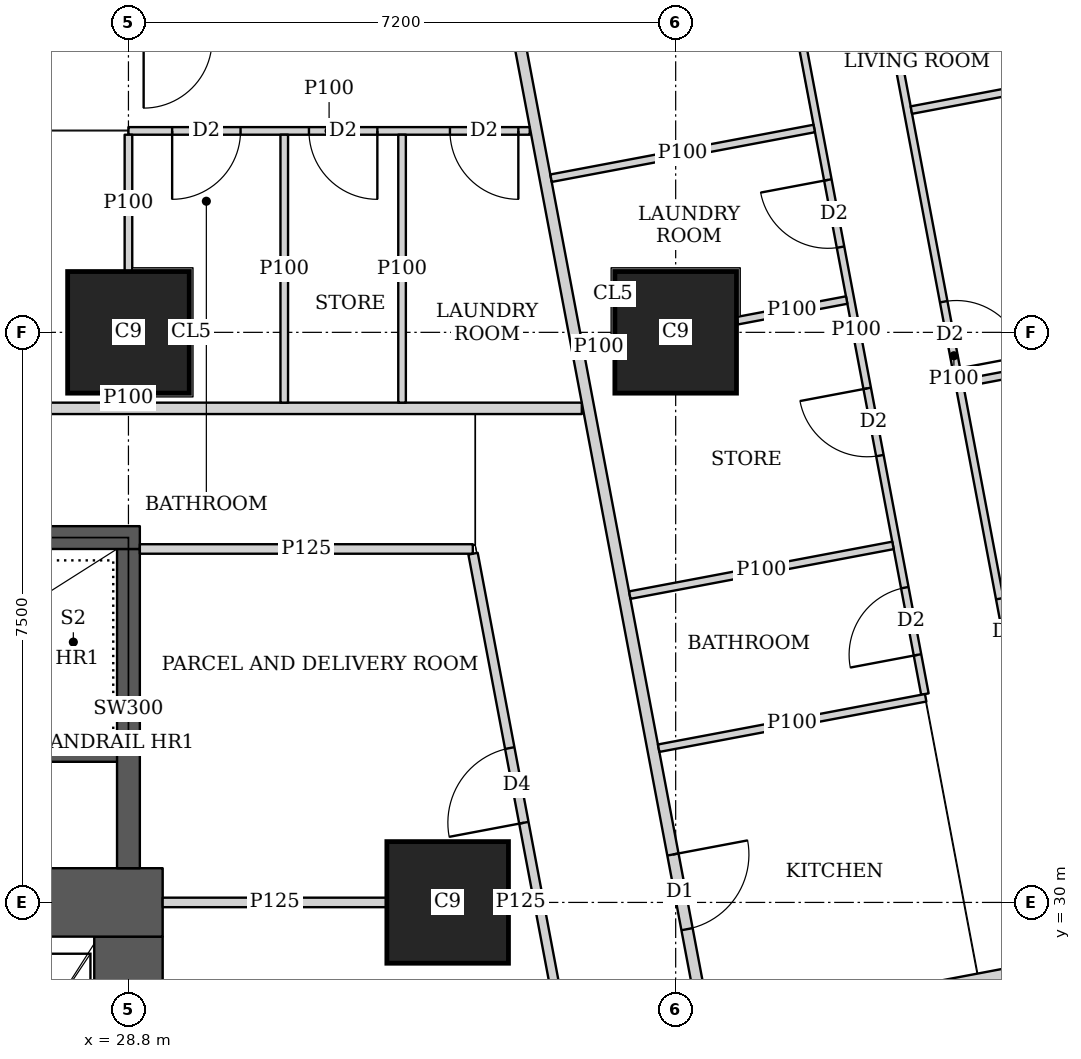
"""IFC4 building model, lengths in metres.
Left out: names, types, materials, properties, quantities, classifications, styles, units other than length and angle.
Written with IfcOpenShell. Run it as: python <this file> out.ifc"""

import sys

from ifc_helpers import new_model, si_unit, direction, frame, frame_2d, origin, origin_2d, place, context, subcontext, project, spatial, rectangle, extrude, element, fill, save


model = new_model("IFC4")
c1 = context("Model", 3, precision=1e-05, world=origin(), true_north=direction((0.0, 1.0)))
c2 = subcontext(c1, "Body", "Model", "MODEL_VIEW")
j1 = project(units=[si_unit("LENGTHUNIT", "METRE"), si_unit("PLANEANGLEUNIT", "RADIAN")], contexts=[c1])
p1 = place(None, origin())
s1 = spatial("IfcSite", under=j1, at=p1, CompositionType="ELEMENT")
p2 = place(p1, origin())
s2 = spatial("IfcBuilding", under=s1, at=p2, CompositionType="ELEMENT")
p3 = place(p2, frame((0.0, 0.0, 89.15)))
s3 = spatial("IfcBuildingStorey", under=s2, at=p3, CompositionType="ELEMENT", Elevation=89.15)
for number, where, z_axis, x_axis in (
    (1, (33.0, 30.0, 0.0), (0.0, 0.0, 1.0), (1.0, 0.0, 0.0)),
    (2, (28.8, 37.5, 0.0), (0.0, 0.0, 1.0), (1.0, 0.0, 0.0)),
    (3, (36.0, 37.5, 0.0), (0.0, 0.0, 1.0), (1.0, 0.0, 0.0)),
):
    element("IfcColumn", number, at=place(p3, frame(where, z_axis=z_axis, x_axis=x_axis)), inside=s3, PredefinedType="COLUMN", context=c2, shape_type="SweptSolid", body=[
        extrude(rectangle(XDim=1.6, YDim=1.6, at=origin_2d()), origin(), (0.0, 0.0, 1.0), 3.75),
    ])
p4 = place(p3, frame((13.95, 30.0, 0.0), z_axis=(0.0, 0.0, 1.0), x_axis=(1.0, 0.0, 0.0)))
e4 = element("IfcWall", 4, at=p4, inside=s3, PredefinedType="SHEAR", context=c2, shape_type="SweptSolid", body=[
    extrude(rectangle(XDim=15.3, YDim=0.9, at=frame_2d((7.65, 0.0))), origin(), (0.0, 0.0, 1.0), 3.75),
])
p5 = place(p4, frame((4.45, 0.0, 0.0)))
e5 = element("IfcOpeningElement", 5, at=p5, cuts=e4, PredefinedType="OPENING", context=c2, shape_type="SweptSolid", body=[
    extrude(rectangle(XDim=1.8, YDim=2.1, at=frame_2d((0.9, 1.05))), frame((0.0, 0.46, 0.0), z_axis=(0.0, -1.0, 0.0), x_axis=(1.0, 0.0, 0.0)), (0.0, 0.0, 1.0), 0.92),
])
p6 = place(p4, frame((10.7, 0.0, 0.0)))
e6 = element("IfcOpeningElement", 6, at=p6, cuts=e4, PredefinedType="OPENING", context=c2, shape_type="SweptSolid", body=[
    extrude(rectangle(XDim=1.1, YDim=2.1, at=frame_2d((0.55, 1.05))), frame((0.0, 0.46, 0.0), z_axis=(0.0, -1.0, 0.0), x_axis=(1.0, 0.0, 0.0)), (0.0, 0.0, 1.0), 0.92),
])
p7 = place(p3, frame((28.8, 15.45, 0.0), z_axis=(0.0, 0.0, 1.0), x_axis=(0.0, 1.0, 0.0)))
e7 = element("IfcWall", 7, at=p7, inside=s3, PredefinedType="SHEAR", context=c2, shape_type="SweptSolid", body=[
    extrude(rectangle(XDim=14.1, YDim=0.9, at=frame_2d((7.05, 0.0))), origin(), (0.0, 0.0, 1.0), 3.75),
])
p8 = place(p3, frame((21.45, 34.8, 0.0), z_axis=(0.0, 0.0, 1.0), x_axis=(1.0, 0.0, 0.0)))
e8 = element("IfcWall", 8, at=p8, inside=s3, PredefinedType="SHEAR", context=c2, shape_type="SweptSolid", body=[
    extrude(rectangle(XDim=7.5, YDim=0.3, at=frame_2d((3.75, 0.0))), origin(), (0.0, 0.0, 1.0), 3.75),
])
p9 = place(p8, frame((0.5, 0.0, 0.0)))
e9 = element("IfcOpeningElement", 9, at=p9, cuts=e8, PredefinedType="OPENING", context=c2, shape_type="SweptSolid", body=[
    extrude(rectangle(XDim=1.1, YDim=2.1, at=frame_2d((0.55, 1.05))), frame((0.0, 0.16, 0.0), z_axis=(0.0, -1.0, 0.0), x_axis=(1.0, 0.0, 0.0)), (0.0, 0.0, 1.0), 0.32),
])
p10 = place(p3, frame((28.8, 30.45, 0.0), z_axis=(0.0, 0.0, 1.0), x_axis=(0.0, 1.0, 0.0)))
e10 = element("IfcWall", 10, at=p10, inside=s3, PredefinedType="SHEAR", context=c2, shape_type="SweptSolid", body=[
    extrude(rectangle(XDim=4.2, YDim=0.3, at=frame_2d((2.1, 0.0))), origin(), (0.0, 0.0, 1.0), 3.75),
])
p11 = place(p3, frame((8.35, 36.5, 0.0), z_axis=(0.0, 0.0, 1.0), x_axis=(1.0, 0.0, 0.0)))
e11 = element("IfcWall", 11, at=p11, inside=s3, PredefinedType="SOLIDWALL", context=c2, shape_type="SweptSolid", body=[
    extrude(rectangle(XDim=26.415, YDim=0.15, at=frame_2d((13.208, 0.0))), origin(), (0.0, 0.0, 1.0), 3.5),
])
p12 = place(p11, frame((2.6, 0.0, 0.0)))
e12 = element("IfcOpeningElement", 12, at=p12, cuts=e11, PredefinedType="OPENING", context=c2, shape_type="SweptSolid", body=[
    extrude(rectangle(XDim=1.0, YDim=2.1, at=frame_2d((0.5, 1.05))), frame((0.0, 0.085, 0.0), z_axis=(0.0, -1.0, 0.0), x_axis=(1.0, 0.0, 0.0)), (0.0, 0.0, 1.0), 0.17),
])
p13 = place(p11, frame((10.75, 0.0, 0.0)))
e13 = element("IfcOpeningElement", 13, at=p13, cuts=e11, PredefinedType="OPENING", context=c2, shape_type="SweptSolid", body=[
    extrude(rectangle(XDim=1.0, YDim=2.1, at=frame_2d((0.5, 1.05))), frame((0.0, 0.085, 0.0), z_axis=(0.0, -1.0, 0.0), x_axis=(1.0, 0.0, 0.0)), (0.0, 0.0, 1.0), 0.17),
])
p14 = place(p11, frame((18.007, 0.0, 0.0)))
e14 = element("IfcOpeningElement", 14, at=p14, cuts=e11, PredefinedType="OPENING", context=c2, shape_type="SweptSolid", body=[
    extrude(rectangle(XDim=1.0, YDim=2.1, at=frame_2d((0.5, 1.05))), frame((0.0, 0.085, 0.0), z_axis=(0.0, -1.0, 0.0), x_axis=(1.0, 0.0, 0.0)), (0.0, 0.0, 1.0), 0.17),
])
p15 = place(p3, frame((33.127, 45.65, 0.0), z_axis=(0.0, 0.0, 1.0), x_axis=(0.185598547723, -0.98262565562, 0.0)))
e15 = element("IfcWall", 15, at=p15, inside=s3, PredefinedType="SOLIDWALL", context=c2, shape_type="SweptSolid", body=[
    extrude(rectangle(XDim=47.118, YDim=0.15, at=frame_2d((23.559, 0.0))), origin(), (0.0, 0.0, 1.0), 2.2),
])
p16 = place(p15, frame((15.285, 0.0, 0.0)))
e16 = element("IfcOpeningElement", 16, at=p16, cuts=e15, PredefinedType="OPENING", context=c2, shape_type="SweptSolid", body=[
    extrude(rectangle(XDim=1.0, YDim=2.1, at=frame_2d((0.5, 1.05))), frame((0.0, 0.085, 0.0), z_axis=(0.0, -1.0, 0.0), x_axis=(1.0, 0.0, 0.0)), (0.0, 0.0, 1.0), 0.17),
])
p17 = place(p15, frame((19.102, 0.0, 0.0)))
e17 = element("IfcOpeningElement", 17, at=p17, cuts=e15, PredefinedType="OPENING", context=c2, shape_type="SweptSolid", body=[
    extrude(rectangle(XDim=1.0, YDim=2.1, at=frame_2d((0.5, 1.05))), frame((0.0, 0.085, 0.0), z_axis=(0.0, -1.0, 0.0), x_axis=(1.0, 0.0, 0.0)), (0.0, 0.0, 1.0), 0.17),
])
p18 = place(p15, frame((33.88, 0.0, 0.0)))
e18 = element("IfcOpeningElement", 18, at=p18, cuts=e15, PredefinedType="OPENING", context=c2, shape_type="SweptSolid", body=[
    extrude(rectangle(XDim=1.0, YDim=2.1, at=frame_2d((0.5, 1.05))), frame((0.0, 0.085, 0.0), z_axis=(0.0, -1.0, 0.0), x_axis=(1.0, 0.0, 0.0)), (0.0, 0.0, 1.0), 0.17),
])
p19 = place(p3, frame((38.862, 41.42, 0.0), z_axis=(0.0, 0.0, 1.0), x_axis=(0.185574815416, -0.982630137887, 0.0)))
e19 = element("IfcWall", 19, at=p19, inside=s3, PredefinedType="PARTITIONING", context=c2, shape_type="SweptSolid", body=[
    extrude(rectangle(XDim=8.605, YDim=0.1, at=frame_2d((4.303, 0.0))), origin(), (0.0, 0.0, 1.0), 3.5),
])
p20 = place(p19, frame((7.555, 0.0, 0.0)))
e20 = element("IfcOpeningElement", 20, at=p20, cuts=e19, PredefinedType="OPENING", context=c2, shape_type="SweptSolid", body=[
    extrude(rectangle(XDim=0.9, YDim=2.1, at=frame_2d((0.45, 1.05))), frame((0.0, 0.06, 0.0), z_axis=(0.0, -1.0, 0.0), x_axis=(1.0, 0.0, 0.0)), (0.0, 0.0, 1.0), 0.12),
])
p21 = place(p19, frame((3.579, 0.0, 0.0)))
e21 = element("IfcOpeningElement", 21, at=p21, cuts=e19, PredefinedType="OPENING", context=c2, shape_type="SweptSolid", body=[
    extrude(rectangle(XDim=0.9, YDim=2.1, at=frame_2d((0.45, 1.05))), frame((0.0, 0.06, 0.0), z_axis=(0.0, -1.0, 0.0), x_axis=(1.0, 0.0, 0.0)), (0.0, 0.0, 1.0), 0.12),
])
p22 = place(p3, frame((37.473, 42.309, 0.0), z_axis=(0.0, 0.0, 1.0), x_axis=(0.185491912953, -0.982645790827, 0.0)))
e22 = element("IfcWall", 22, at=p22, inside=s3, PredefinedType="PARTITIONING", context=c2, shape_type="SweptSolid", body=[
    extrude(rectangle(XDim=9.737, YDim=0.1, at=frame_2d((4.869, 0.0))), origin(), (0.0, 0.0, 1.0), 3.5),
])
p23 = place(p22, frame((8.312, 0.0, 0.0)))
e23 = element("IfcOpeningElement", 23, at=p23, cuts=e22, PredefinedType="OPENING", context=c2, shape_type="SweptSolid", body=[
    extrude(rectangle(XDim=0.9, YDim=2.1, at=frame_2d((0.45, 1.05))), frame((0.0, 0.06, 0.0), z_axis=(0.0, -1.0, 0.0), x_axis=(1.0, 0.0, 0.0)), (0.0, 0.0, 1.0), 0.12),
])
p24 = place(p22, frame((2.853, 0.0, 0.0)))
e24 = element("IfcOpeningElement", 24, at=p24, cuts=e22, PredefinedType="OPENING", context=c2, shape_type="SweptSolid", body=[
    extrude(rectangle(XDim=0.9, YDim=2.1, at=frame_2d((0.45, 1.05))), frame((0.0, 0.06, 0.0), z_axis=(0.0, -1.0, 0.0), x_axis=(1.0, 0.0, 0.0)), (0.0, 0.0, 1.0), 0.12),
])
p25 = place(p22, frame((5.644, 0.0, 0.0)))
e25 = element("IfcOpeningElement", 25, at=p25, cuts=e22, PredefinedType="OPENING", context=c2, shape_type="SweptSolid", body=[
    extrude(rectangle(XDim=0.9, YDim=2.1, at=frame_2d((0.45, 1.05))), frame((0.0, 0.06, 0.0), z_axis=(0.0, -1.0, 0.0), x_axis=(1.0, 0.0, 0.0)), (0.0, 0.0, 1.0), 0.12),
])
p26 = place(p3, frame((43.277, 41.212, 0.0), z_axis=(0.0, 0.0, 1.0), x_axis=(-0.982665405803, -0.185387972203, 0.0)))
e26 = element("IfcWall", 26, at=p26, inside=s3, PredefinedType="PARTITIONING", context=c2, shape_type="SweptSolid", body=[
    extrude(rectangle(XDim=4.25, YDim=0.1, at=frame_2d((2.125, 0.0))), origin(), (0.0, 0.0, 1.0), 2.05),
])
p27 = place(p3, frame((40.954, 37.053, 0.0), z_axis=(0.0, 0.0, 1.0), x_axis=(-0.982628652346, -0.185582681276, 0.0)))
e27 = element("IfcWall", 27, at=p27, inside=s3, PredefinedType="PARTITIONING", context=c2, shape_type="SweptSolid", body=[
    extrude(rectangle(XDim=1.196, YDim=0.1, at=frame_2d((0.598, 0.0))), origin(), (0.0, 0.0, 1.0), 2.05),
])
p28 = place(p3, frame((37.823, 40.182, 0.0), z_axis=(0.0, 0.0, 1.0), x_axis=(-0.98263926043, -0.185526504472, 0.0)))
e28 = element("IfcWall", 28, at=p28, inside=s3, PredefinedType="PARTITIONING", context=c2, shape_type="SweptSolid", body=[
    extrude(rectangle(XDim=3.524, YDim=0.1, at=frame_2d((1.762, 0.0))), origin(), (0.0, 0.0, 1.0), 3.5),
])
p29 = place(p3, frame((38.25, 37.925, 0.0), z_axis=(0.0, 0.0, 1.0), x_axis=(-0.982626127294, -0.185596050493, 0.0)))
e29 = element("IfcWall", 29, at=p29, inside=s3, PredefinedType="PARTITIONING", context=c2, shape_type="SweptSolid", body=[
    extrude(rectangle(XDim=1.465, YDim=0.1, at=frame_2d((0.733, 0.0))), origin(), (0.0, 0.0, 1.0), 3.5),
])
p30 = place(p3, frame((35.19, 37.347, 0.0), z_axis=(0.0, 0.0, 1.0), x_axis=(-0.982798158448, -0.184682916784, 0.0)))
e30 = element("IfcWall", 30, at=p30, inside=s3, PredefinedType="PARTITIONING", context=c2, shape_type="SweptSolid", body=[
    extrude(rectangle(XDim=0.411, YDim=0.1, at=frame_2d((0.206, 0.0))), origin(), (0.0, 0.0, 1.0), 3.5),
])
p31 = place(p3, frame((39.289, 32.692, 0.0), z_axis=(0.0, 0.0, 1.0), x_axis=(-0.982662827464, -0.185401638399, 0.0)))
e31 = element("IfcWall", 31, at=p31, inside=s3, PredefinedType="PARTITIONING", context=c2, shape_type="SweptSolid", body=[
    extrude(rectangle(XDim=3.575, YDim=0.1, at=frame_2d((1.788, 0.0))), origin(), (0.0, 0.0, 1.0), 3.5),
])
p32 = place(p3, frame((38.859, 34.697, 0.0), z_axis=(0.0, 0.0, 1.0), x_axis=(-0.982626628545, -0.185593396635, 0.0)))
e32 = element("IfcWall", 32, at=p32, inside=s3, PredefinedType="PARTITIONING", context=c2, shape_type="SweptSolid", body=[
    extrude(rectangle(XDim=3.524, YDim=0.1, at=frame_2d((1.762, 0.0))), origin(), (0.0, 0.0, 1.0), 3.5),
])
p33 = place(p3, frame((41.177, 29.164, 0.0), z_axis=(0.0, 0.0, 1.0), x_axis=(-0.982642846239, -0.185507511263, 0.0)))
e33 = element("IfcWall", 33, at=p33, inside=s3, PredefinedType="SOLIDWALL", context=c2, shape_type="SweptSolid", body=[
    extrude(rectangle(XDim=4.776, YDim=0.25, at=frame_2d((2.388, 0.0))), origin(), (0.0, 0.0, 1.0), 2.5),
])
p34 = place(p3, frame((28.8, 40.15, 0.0), z_axis=(0.0, 0.0, 1.0), x_axis=(1.0, 0.0, 0.0)))
e34 = element("IfcWall", 34, at=p34, inside=s3, PredefinedType="PARTITIONING", context=c2, shape_type="SweptSolid", body=[
    extrude(rectangle(XDim=5.28, YDim=0.1, at=frame_2d((2.64, 0.0))), origin(), (0.0, 0.0, 1.0), 3.5),
])
p35 = place(p34, frame((0.575, 0.0, 0.0)))
e35 = element("IfcOpeningElement", 35, at=p35, cuts=e34, PredefinedType="OPENING", context=c2, shape_type="SweptSolid", body=[
    extrude(rectangle(XDim=0.9, YDim=2.1, at=frame_2d((0.45, 1.05))), frame((0.0, 0.06, 0.0), z_axis=(0.0, -1.0, 0.0), x_axis=(1.0, 0.0, 0.0)), (0.0, 0.0, 1.0), 0.12),
])
p36 = place(p34, frame((4.23, 0.0, 0.0)))
e36 = element("IfcOpeningElement", 36, at=p36, cuts=e34, PredefinedType="OPENING", context=c2, shape_type="SweptSolid", body=[
    extrude(rectangle(XDim=0.9, YDim=2.1, at=frame_2d((0.45, 1.05))), frame((0.0, 0.06, 0.0), z_axis=(0.0, -1.0, 0.0), x_axis=(1.0, 0.0, 0.0)), (0.0, 0.0, 1.0), 0.12),
])
p37 = place(p34, frame((2.375, 0.0, 0.0)))
e37 = element("IfcOpeningElement", 37, at=p37, cuts=e34, PredefinedType="OPENING", context=c2, shape_type="SweptSolid", body=[
    extrude(rectangle(XDim=0.9, YDim=2.1, at=frame_2d((0.45, 1.05))), frame((0.0, 0.06, 0.0), z_axis=(0.0, -1.0, 0.0), x_axis=(1.0, 0.0, 0.0)), (0.0, 0.0, 1.0), 0.12),
])
p38 = place(p3, frame((28.8, 36.575, 0.0), z_axis=(0.0, 0.0, 1.0), x_axis=(0.0, 1.0, 0.0)))
e38 = element("IfcWall", 38, at=p38, inside=s3, PredefinedType="PARTITIONING", context=c2, shape_type="SweptSolid", body=[
    extrude(rectangle(XDim=0.124, YDim=0.1, at=frame_2d((0.062, 0.0))), origin(), (0.0, 0.0, 1.0), 3.5),
])
p39 = place(p3, frame((28.8, 38.301, 0.0), z_axis=(0.0, 0.0, 1.0), x_axis=(0.0, 1.0, 0.0)))
e39 = element("IfcWall", 39, at=p39, inside=s3, PredefinedType="PARTITIONING", context=c2, shape_type="SweptSolid", body=[
    extrude(rectangle(XDim=1.799, YDim=0.1, at=frame_2d((0.899, 0.0))), origin(), (0.0, 0.0, 1.0), 3.5),
])
for number, where, z_axis, x_axis in (
    (40, (32.4, 36.575, 0.0), (0.0, 0.0, 1.0), (0.0, 1.0, 0.0)),
    (41, (30.85, 36.575, 0.0), (0.0, 0.0, 1.0), (0.0, 1.0, 0.0)),
):
    element("IfcWall", number, at=place(p3, frame(where, z_axis=z_axis, x_axis=x_axis)), inside=s3, PredefinedType="PARTITIONING", context=c2, shape_type="SweptSolid", body=[
        extrude(rectangle(XDim=3.525, YDim=0.1, at=frame_2d((1.763, 0.0))), origin(), (0.0, 0.0, 1.0), 3.5),
    ])
p40 = place(p3, frame((28.95, 34.65, 0.0), z_axis=(0.0, 0.0, 1.0), x_axis=(1.0, 0.0, 0.0)))
e42 = element("IfcWall", 42, at=p40, inside=s3, PredefinedType="PARTITIONING", context=c2, shape_type="SweptSolid", body=[
    extrude(rectangle(XDim=4.381, YDim=0.125, at=frame_2d((2.19, 0.0))), origin(), (0.0, 0.0, 1.0), 3.5),
])
p41 = place(p3, frame((37.9, 10.413, 0.0), z_axis=(0.0, 0.0, 1.0), x_axis=(-0.185589740669, 0.982627319058, 0.0)))
e43 = element("IfcWall", 43, at=p41, inside=s3, PredefinedType="PARTITIONING", context=c2, shape_type="SweptSolid", body=[
    extrude(rectangle(XDim=24.602, YDim=0.125, at=frame_2d((12.301, 0.0))), origin(), (0.0, 0.0, 1.0), 2.5),
])
p42 = place(p41, frame((0.708, 0.0, 0.0)))
e44 = element("IfcOpeningElement", 44, at=p42, cuts=e43, PredefinedType="OPENING", context=c2, shape_type="SweptSolid", body=[
    extrude(rectangle(XDim=1.0, YDim=2.1, at=frame_2d((0.5, 1.05))), frame((0.0, 0.073, 0.0), z_axis=(0.0, -1.0, 0.0), x_axis=(1.0, 0.0, 0.0)), (0.0, 0.0, 1.0), 0.145),
])
p43 = place(p41, frame((5.75, 0.0, 0.0)))
e45 = element("IfcOpeningElement", 45, at=p43, cuts=e43, PredefinedType="OPENING", context=c2, shape_type="SweptSolid", body=[
    extrude(rectangle(XDim=1.0, YDim=2.1, at=frame_2d((0.5, 1.05))), frame((0.0, 0.073, 0.0), z_axis=(0.0, -1.0, 0.0), x_axis=(1.0, 0.0, 0.0)), (0.0, 0.0, 1.0), 0.145),
])
p44 = place(p41, frame((13.124, 0.0, 0.0)))
e46 = element("IfcOpeningElement", 46, at=p44, cuts=e43, PredefinedType="OPENING", context=c2, shape_type="SweptSolid", body=[
    extrude(rectangle(XDim=1.0, YDim=2.1, at=frame_2d((0.5, 1.05))), frame((0.0, 0.073, 0.0), z_axis=(0.0, -1.0, 0.0), x_axis=(1.0, 0.0, 0.0)), (0.0, 0.0, 1.0), 0.145),
])
p45 = place(p41, frame((16.94, 0.0, 0.0)))
e47 = element("IfcOpeningElement", 47, at=p45, cuts=e43, PredefinedType="OPENING", context=c2, shape_type="SweptSolid", body=[
    extrude(rectangle(XDim=1.0, YDim=2.1, at=frame_2d((0.5, 1.05))), frame((0.0, 0.073, 0.0), z_axis=(0.0, -1.0, 0.0), x_axis=(1.0, 0.0, 0.0)), (0.0, 0.0, 1.0), 0.145),
])
p46 = place(p41, frame((21.0, 0.0, 0.0)))
e48 = element("IfcOpeningElement", 48, at=p46, cuts=e43, PredefinedType="OPENING", context=c2, shape_type="SweptSolid", body=[
    extrude(rectangle(XDim=1.0, YDim=2.1, at=frame_2d((0.5, 1.05))), frame((0.0, 0.073, 0.0), z_axis=(0.0, -1.0, 0.0), x_axis=(1.0, 0.0, 0.0)), (0.0, 0.0, 1.0), 0.145),
])
p47 = place(p3, frame((29.25, 30.0, 0.0), z_axis=(0.0, 0.0, 1.0), x_axis=(1.0, 0.0, 0.0)))
e49 = element("IfcWall", 49, at=p47, inside=s3, PredefinedType="PARTITIONING", context=c2, shape_type="SweptSolid", body=[
    extrude(rectangle(XDim=2.949, YDim=0.125, at=frame_2d((1.475, 0.0))), origin(), (0.0, 0.0, 1.0), 3.5),
])
p48 = place(p3, frame((33.801, 30.0, 0.0), z_axis=(0.0, 0.0, 1.0), x_axis=(1.0, 0.0, 0.0)))
e50 = element("IfcWall", 50, at=p48, inside=s3, PredefinedType="PARTITIONING", context=c2, shape_type="SweptSolid", body=[
    extrude(rectangle(XDim=0.324, YDim=0.125, at=frame_2d((0.162, 0.0))), origin(), (0.0, 0.0, 1.0), 2.5),
])
p49 = place(p3, frame((23.0, 31.95, 0.0), z_axis=(0.0, 0.0, 1.0), x_axis=(1.0, 0.0, 0.0)))
e51 = element("IfcWall", 51, at=p49, inside=s3, PredefinedType="SHEAR", context=c2, shape_type="SweptSolid", body=[
    extrude(rectangle(XDim=5.8, YDim=0.2, at=frame_2d((2.9, 0.0))), origin(), (0.0, 0.0, 1.0), 3.75),
])
p50 = place(p20, origin())
e52 = element("IfcDoor", 52, at=p50, inside=s3, OperationType="SINGLE_SWING_RIGHT", PredefinedType="DOOR", context=c2, shape_type="SweptSolid", body=[
    extrude(rectangle(XDim=0.9, YDim=2.1, at=frame_2d((0.45, 1.05))), frame((0.0, 0.025, 0.0), z_axis=(0.0, -1.0, 0.0), x_axis=(1.0, 0.0, 0.0)), (0.0, 0.0, 1.0), 0.05),
])
fill(e20, e52)
p51 = place(p21, origin())
e53 = element("IfcDoor", 53, at=p51, inside=s3, OperationType="SINGLE_SWING_RIGHT", PredefinedType="DOOR", context=c2, shape_type="SweptSolid", body=[
    extrude(rectangle(XDim=0.9, YDim=2.1, at=frame_2d((0.45, 1.05))), frame((0.0, 0.025, 0.0), z_axis=(0.0, -1.0, 0.0), x_axis=(1.0, 0.0, 0.0)), (0.0, 0.0, 1.0), 0.05),
])
fill(e21, e53)
p52 = place(p23, origin())
e54 = element("IfcDoor", 54, at=p52, inside=s3, OperationType="SINGLE_SWING_LEFT", PredefinedType="DOOR", context=c2, shape_type="SweptSolid", body=[
    extrude(rectangle(XDim=0.9, YDim=2.1, at=frame_2d((0.45, 1.05))), frame((0.0, 0.025, 0.0), z_axis=(0.0, -1.0, 0.0), x_axis=(1.0, 0.0, 0.0)), (0.0, 0.0, 1.0), 0.05),
])
fill(e23, e54)
p53 = place(p24, origin())
e55 = element("IfcDoor", 55, at=p53, inside=s3, OperationType="SINGLE_SWING_RIGHT", PredefinedType="DOOR", context=c2, shape_type="SweptSolid", body=[
    extrude(rectangle(XDim=0.9, YDim=2.1, at=frame_2d((0.45, 1.05))), frame((0.0, 0.025, 0.0), z_axis=(0.0, -1.0, 0.0), x_axis=(1.0, 0.0, 0.0)), (0.0, 0.0, 1.0), 0.05),
])
fill(e24, e55)
p54 = place(p25, origin())
e56 = element("IfcDoor", 56, at=p54, inside=s3, OperationType="SINGLE_SWING_RIGHT", PredefinedType="DOOR", context=c2, shape_type="SweptSolid", body=[
    extrude(rectangle(XDim=0.9, YDim=2.1, at=frame_2d((0.45, 1.05))), frame((0.0, 0.025, 0.0), z_axis=(0.0, -1.0, 0.0), x_axis=(1.0, 0.0, 0.0)), (0.0, 0.0, 1.0), 0.05),
])
fill(e25, e56)
p55 = place(p16, origin())
e57 = element("IfcDoor", 57, at=p55, inside=s3, OperationType="SINGLE_SWING_LEFT", PredefinedType="DOOR", context=c2, shape_type="SweptSolid", body=[
    extrude(rectangle(XDim=1.0, YDim=2.1, at=frame_2d((0.5, 1.05))), frame((0.0, 0.025, 0.0), z_axis=(0.0, -1.0, 0.0), x_axis=(1.0, 0.0, 0.0)), (0.0, 0.0, 1.0), 0.05),
])
fill(e16, e57)
p56 = place(p35, origin())
e58 = element("IfcDoor", 58, at=p56, inside=s3, OperationType="SINGLE_SWING_RIGHT", PredefinedType="DOOR", context=c2, shape_type="SweptSolid", body=[
    extrude(rectangle(XDim=0.9, YDim=2.1, at=frame_2d((0.45, 1.05))), frame((0.0, 0.025, 0.0), z_axis=(0.0, -1.0, 0.0), x_axis=(1.0, 0.0, 0.0)), (0.0, 0.0, 1.0), 0.05),
])
fill(e35, e58)
p57 = place(p36, origin())
e59 = element("IfcDoor", 59, at=p57, inside=s3, OperationType="SINGLE_SWING_LEFT", PredefinedType="DOOR", context=c2, shape_type="SweptSolid", body=[
    extrude(rectangle(XDim=0.9, YDim=2.1, at=frame_2d((0.45, 1.05))), frame((0.0, 0.025, 0.0), z_axis=(0.0, -1.0, 0.0), x_axis=(1.0, 0.0, 0.0)), (0.0, 0.0, 1.0), 0.05),
])
fill(e36, e59)
p58 = place(p37, origin())
e60 = element("IfcDoor", 60, at=p58, inside=s3, OperationType="SINGLE_SWING_LEFT", PredefinedType="DOOR", context=c2, shape_type="SweptSolid", body=[
    extrude(rectangle(XDim=0.9, YDim=2.1, at=frame_2d((0.45, 1.05))), frame((0.0, 0.025, 0.0), z_axis=(0.0, -1.0, 0.0), x_axis=(1.0, 0.0, 0.0)), (0.0, 0.0, 1.0), 0.05),
])
fill(e37, e60)
p59 = place(p46, origin())
e61 = element("IfcDoor", 61, at=p59, inside=s3, OperationType="SINGLE_SWING_LEFT", PredefinedType="DOOR", context=c2, shape_type="SweptSolid", body=[
    extrude(rectangle(XDim=1.0, YDim=2.1, at=frame_2d((0.5, 1.05))), frame((0.0, 0.025, 0.0), z_axis=(0.0, -1.0, 0.0), x_axis=(1.0, 0.0, 0.0)), (0.0, 0.0, 1.0), 0.05),
])
fill(e48, e61)
save(model, sys.argv[1])
